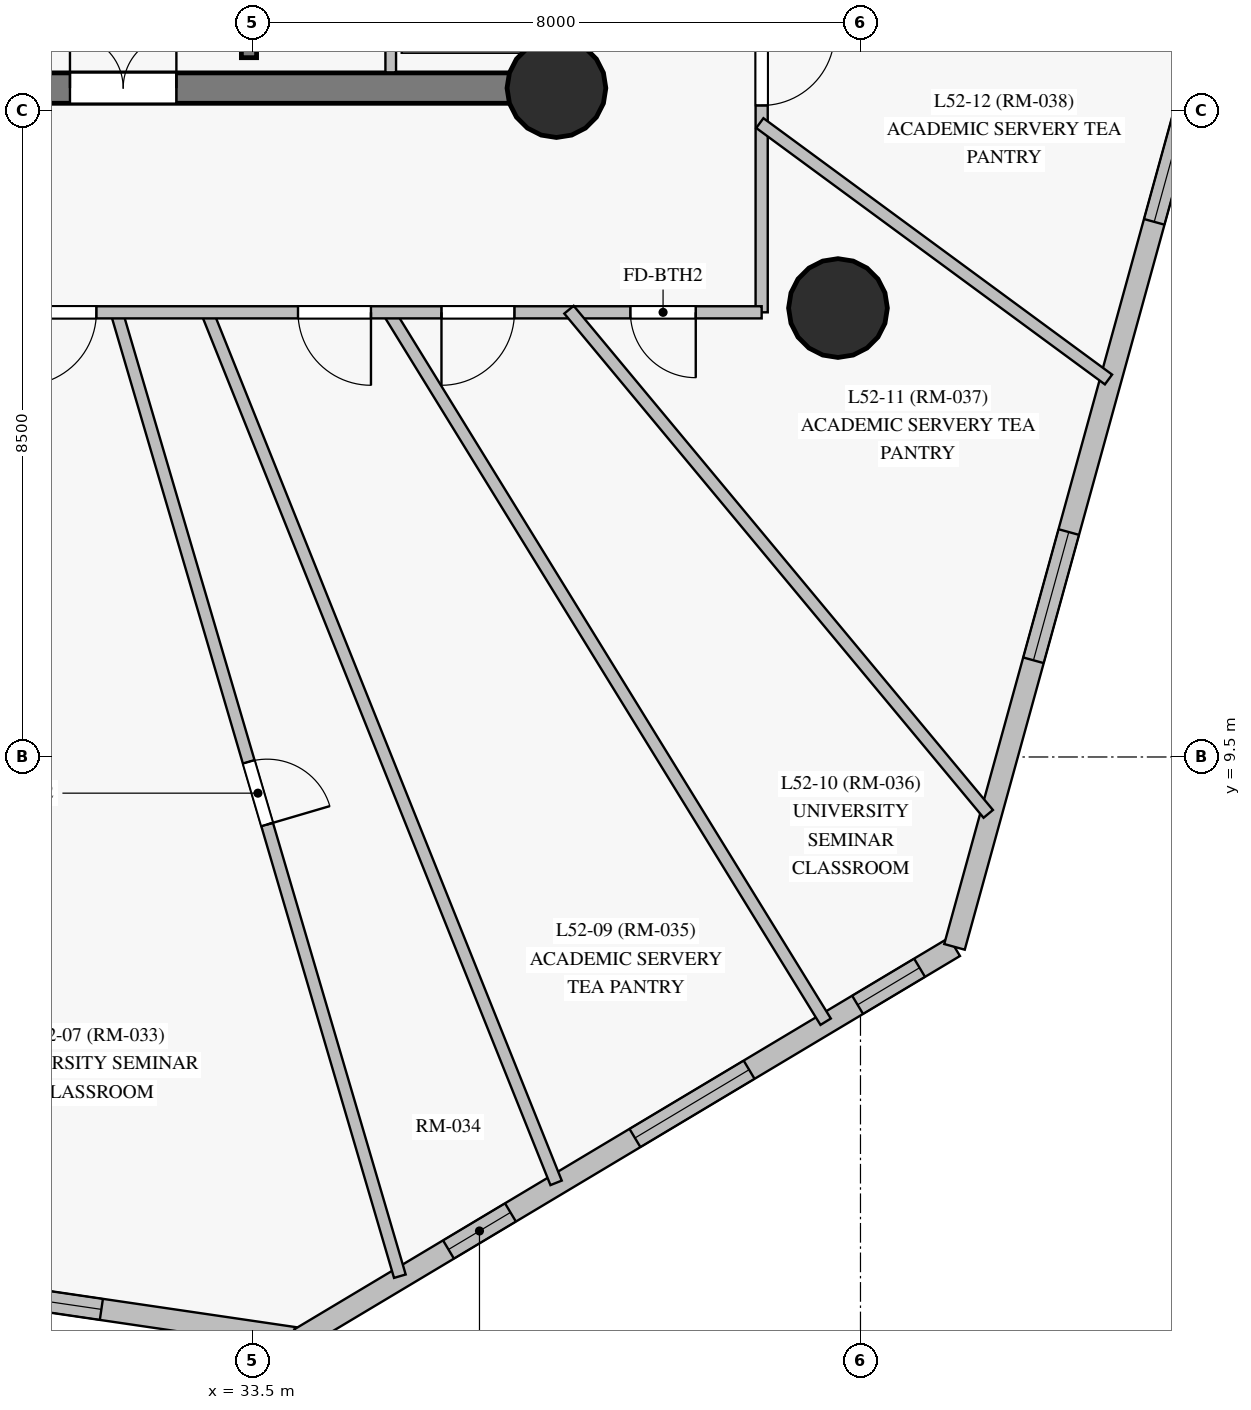
"""IFC4 building model, lengths in metres.
Left out: names, types, materials, properties, quantities, classifications, styles, units other than length and angle.
Written with IfcOpenShell. Run it as: python <this file> out.ifc"""

import sys

from ifc_helpers import new_model, si_unit, direction, frame, frame_2d, origin, origin_with_axes, origin_2d, place, context, subcontext, project, spatial, rectangle, circle, extrude, source, transform, mapped, element, fill, save


model = new_model("IFC4")
c1 = context("Model", 3, precision=1e-05, world=origin(), true_north=direction((0.0, 1.0)))
c2 = subcontext(c1, "Body", "Model", "MODEL_VIEW")
j1 = project(units=[si_unit("LENGTHUNIT", "METRE"), si_unit("PLANEANGLEUNIT", "RADIAN")], contexts=[c1])
p1 = place(None, origin())
s1 = spatial("IfcSite", under=j1, at=p1, CompositionType="ELEMENT")
p2 = place(p1, origin())
s2 = spatial("IfcBuilding", under=s1, at=p2, CompositionType="ELEMENT")
p3 = place(p2, frame((0.0, 0.0, 180.95)))
s3 = spatial("IfcBuildingStorey", under=s2, at=p3, CompositionType="ELEMENT", Elevation=180.95)
p4 = place(p3, frame((26.55, 18.3, 0.0), z_axis=(0.0, 0.0, 1.0), x_axis=(1.0, 0.0, 0.0)))
e1 = element("IfcWall", 1, at=p4, inside=s3, PredefinedType="SHEAR", context=c2, shape_type="SweptSolid", body=[
    extrude(rectangle(XDim=10.95, YDim=0.4, at=frame_2d((5.475, 0.0))), origin(), (0.0, 0.0, 1.0), 2.825),
])
p5 = place(p4, frame((4.55, 0.0, 0.0)))
e2 = element("IfcOpeningElement", 2, at=p5, cuts=e1, PredefinedType="OPENING", context=c2, shape_type="SweptSolid", body=[
    extrude(rectangle(XDim=1.4, YDim=2.2, at=frame_2d((0.7, 1.1))), frame((0.0, 0.21, 0.0), z_axis=(0.0, -1.0, 0.0), x_axis=(1.0, 0.0, 0.0)), (0.0, 0.0, 1.0), 0.42),
])
p6 = place(p3, frame((37.5, 18.3, 0.0), z_axis=(0.0, 0.0, 1.0), x_axis=(0.0, 1.0, 0.0)))
e3 = element("IfcWall", 3, at=p6, inside=s3, PredefinedType="SHEAR", context=c2, shape_type="SweptSolid", body=[
    extrude(rectangle(XDim=16.4, YDim=0.4, at=frame_2d((8.2, 0.0))), origin(), (0.0, 0.0, 1.0), 2.825),
])
p7 = place(p6, frame((14.15, 0.0, 0.0)))
e4 = element("IfcOpeningElement", 4, at=p7, cuts=e3, PredefinedType="OPENING", context=c2, shape_type="SweptSolid", body=[
    extrude(rectangle(XDim=1.2, YDim=2.15, at=frame_2d((0.6, 1.075))), frame((0.0, 0.21, 0.0), z_axis=(0.0, -1.0, 0.0), x_axis=(1.0, 0.0, 0.0)), (0.0, 0.0, 1.0), 0.42),
])
m1 = source(origin_with_axes(), c2, "Body", "SweptSolid", [
    extrude(circle(Radius=0.65, at=origin_2d()), origin(), (0.0, 0.0, 1.0), 3.05),
])
for number, where, z_axis, x_axis in (
    (5, (37.5, 18.3, 0.0), (0.0, 0.0, 1.0), (1.0, 0.0, 0.0)),
    (6, (41.204, 15.406, 0.0), (0.0, 0.0, 1.0), (1.0, 0.0, 0.0)),
):
    element("IfcColumn", number, at=place(p3, frame(where, z_axis=z_axis, x_axis=x_axis)), inside=s3, PredefinedType="COLUMN", context=c2, shape_type="MappedRepresentation", body=[
        mapped(m1, transform((0.0, 0.0, 0.0), scale=1.0)),
    ])
p8 = place(p3, frame((21.422, 3.713, 0.0), z_axis=(0.0, 0.0, 1.0), x_axis=(0.989415023511, -0.145113442696, 0.0)))
e7 = element("IfcWall", 7, at=p8, inside=s3, PredefinedType="SOLIDWALL", context=c2, shape_type="SweptSolid", body=[
    extrude(rectangle(XDim=12.837, YDim=0.28, at=frame_2d((6.418, 0.0))), origin(), (0.0, 0.0, 1.0), 2.825),
])
p9 = place(p8, frame((2.718, 0.0, 0.85)))
e8 = element("IfcOpeningElement", 8, at=p9, cuts=e7, PredefinedType="OPENING", context=c2, shape_type="SweptSolid", body=[
    extrude(rectangle(XDim=1.75, YDim=1.65, at=frame_2d((0.875, 0.825))), frame((0.0, 0.15, 0.0), z_axis=(0.0, -1.0, 0.0), x_axis=(1.0, 0.0, 0.0)), (0.0, 0.0, 1.0), 0.3),
])
p10 = place(p8, frame((8.449, 0.0, 0.85)))
e9 = element("IfcOpeningElement", 9, at=p10, cuts=e7, PredefinedType="OPENING", context=c2, shape_type="SweptSolid", body=[
    extrude(rectangle(XDim=1.75, YDim=1.65, at=frame_2d((0.875, 0.825))), frame((0.0, 0.15, 0.0), z_axis=(0.0, -1.0, 0.0), x_axis=(1.0, 0.0, 0.0)), (0.0, 0.0, 1.0), 0.3),
])
p11 = place(p3, frame((34.123, 1.85, 0.0), z_axis=(0.0, 0.0, 1.0), x_axis=(0.858226046781, 0.513271909057, 0.0)))
e10 = element("IfcWall", 10, at=p11, inside=s3, PredefinedType="SOLIDWALL", context=c2, shape_type="SweptSolid", body=[
    extrude(rectangle(XDim=10.037, YDim=0.28, at=frame_2d((5.019, 0.0))), origin(), (0.0, 0.0, 1.0), 2.825),
])
p12 = place(p11, frame((2.28, 0.0, 0.85)))
e11 = element("IfcOpeningElement", 11, at=p12, cuts=e10, PredefinedType="OPENING", context=c2, shape_type="SweptSolid", body=[
    extrude(rectangle(XDim=0.95, YDim=1.5, at=frame_2d((0.475, 0.75))), frame((0.0, 0.15, 0.0), z_axis=(0.0, -1.0, 0.0), x_axis=(1.0, 0.0, 0.0)), (0.0, 0.0, 1.0), 0.3),
])
p13 = place(p11, frame((5.139, 0.0, 0.85)))
e12 = element("IfcOpeningElement", 12, at=p13, cuts=e10, PredefinedType="OPENING", context=c2, shape_type="SweptSolid", body=[
    extrude(rectangle(XDim=1.75, YDim=1.65, at=frame_2d((0.875, 0.825))), frame((0.0, 0.15, 0.0), z_axis=(0.0, -1.0, 0.0), x_axis=(1.0, 0.0, 0.0)), (0.0, 0.0, 1.0), 0.3),
])
p14 = place(p11, frame((8.552, 0.0, 0.85)))
e13 = element("IfcOpeningElement", 13, at=p14, cuts=e10, PredefinedType="OPENING", context=c2, shape_type="SweptSolid", body=[
    extrude(rectangle(XDim=0.95, YDim=1.5, at=frame_2d((0.475, 0.75))), frame((0.0, 0.15, 0.0), z_axis=(0.0, -1.0, 0.0), x_axis=(1.0, 0.0, 0.0)), (0.0, 0.0, 1.0), 0.3),
])
p15 = place(p3, frame((42.737, 7.002, 0.0), z_axis=(0.0, 0.0, 1.0), x_axis=(0.265596536656, 0.964084270029, 0.0)))
e14 = element("IfcWall", 14, at=p15, inside=s3, PredefinedType="SOLIDWALL", context=c2, shape_type="SweptSolid", body=[
    extrude(rectangle(XDim=14.261, YDim=0.28, at=frame_2d((7.13, 0.0))), origin(), (0.0, 0.0, 1.0), 2.825),
])
p16 = place(p15, frame((3.911, 0.0, 0.85)))
e15 = element("IfcOpeningElement", 15, at=p16, cuts=e14, PredefinedType="OPENING", context=c2, shape_type="SweptSolid", body=[
    extrude(rectangle(XDim=1.75, YDim=1.65, at=frame_2d((0.875, 0.825))), frame((0.0, 0.15, 0.0), z_axis=(0.0, -1.0, 0.0), x_axis=(1.0, 0.0, 0.0)), (0.0, 0.0, 1.0), 0.3),
])
p17 = place(p15, frame((9.894, 0.0, 0.85)))
e16 = element("IfcOpeningElement", 16, at=p17, cuts=e14, PredefinedType="OPENING", context=c2, shape_type="SweptSolid", body=[
    extrude(rectangle(XDim=1.75, YDim=1.65, at=frame_2d((0.875, 0.825))), frame((0.0, 0.15, 0.0), z_axis=(0.0, -1.0, 0.0), x_axis=(1.0, 0.0, 0.0)), (0.0, 0.0, 1.0), 0.3),
])
p18 = place(p3, frame((33.455, 18.7, 0.0), z_axis=(0.0, 0.0, 1.0), x_axis=(0.0, 1.0, 0.0)))
e17 = element("IfcWall", 17, at=p18, inside=s3, PredefinedType="SHEAR", context=c2, shape_type="SweptSolid", body=[
    extrude(rectangle(XDim=15.6, YDim=0.2, at=frame_2d((7.8, 0.0))), origin(), (0.0, 0.0, 1.0), 2.825),
])
p19 = place(p18, frame((2.75, 0.0, 0.0)))
e18 = element("IfcOpeningElement", 18, at=p19, cuts=e17, PredefinedType="OPENING", context=c2, shape_type="SweptSolid", body=[
    extrude(rectangle(XDim=1.15, YDim=2.15, at=frame_2d((0.575, 1.075))), frame((0.0, 0.11, 0.0), z_axis=(0.0, -1.0, 0.0), x_axis=(1.0, 0.0, 0.0)), (0.0, 0.0, 1.0), 0.22),
])
p20 = place(p18, frame((0.55, 0.0, 0.0)))
e19 = element("IfcOpeningElement", 19, at=p20, cuts=e17, PredefinedType="OPENING", context=c2, shape_type="SweptSolid", body=[
    extrude(rectangle(XDim=0.94, YDim=2.1, at=frame_2d((0.47, 1.05))), frame((0.0, 0.11, 0.0), z_axis=(0.0, -1.0, 0.0), x_axis=(1.0, 0.0, 0.0)), (0.0, 0.0, 1.0), 0.22),
])
p21 = place(p3, frame((40.2, 37.65, 0.0), z_axis=(0.0, 0.0, 1.0), x_axis=(0.0, -1.0, 0.0)))
e20 = element("IfcWall", 20, at=p21, inside=s3, PredefinedType="PARTITIONING", context=c2, shape_type="SweptSolid", body=[
    extrude(rectangle(XDim=22.3, YDim=0.16, at=frame_2d((11.15, 0.0))), origin(), (0.0, 0.0, 1.0), 2.375),
])
p22 = place(p21, frame((18.619, 0.0, 0.0)))
e21 = element("IfcOpeningElement", 21, at=p22, cuts=e20, PredefinedType="OPENING", context=c2, shape_type="SweptSolid", body=[
    extrude(rectangle(XDim=0.96, YDim=2.15, at=frame_2d((0.48, 1.075))), frame((0.0, 0.09, 0.0), z_axis=(0.0, -1.0, 0.0), x_axis=(1.0, 0.0, 0.0)), (0.0, 0.0, 1.0), 0.18),
])
p23 = place(p21, frame((16.25, 0.0, 0.0)))
e22 = element("IfcOpeningElement", 22, at=p23, cuts=e20, PredefinedType="OPENING", context=c2, shape_type="SweptSolid", body=[
    extrude(rectangle(XDim=0.96, YDim=2.15, at=frame_2d((0.48, 1.075))), frame((0.0, 0.09, 0.0), z_axis=(0.0, -1.0, 0.0), x_axis=(1.0, 0.0, 0.0)), (0.0, 0.0, 1.0), 0.18),
])
p24 = place(p21, frame((10.675, 0.0, 0.0)))
e23 = element("IfcOpeningElement", 23, at=p24, cuts=e20, PredefinedType="OPENING", context=c2, shape_type="SweptSolid", body=[
    extrude(rectangle(XDim=0.96, YDim=2.15, at=frame_2d((0.48, 1.075))), frame((0.0, 0.09, 0.0), z_axis=(0.0, -1.0, 0.0), x_axis=(1.0, 0.0, 0.0)), (0.0, 0.0, 1.0), 0.18),
])
p25 = place(p21, frame((7.33, 0.0, 0.0)))
e24 = element("IfcOpeningElement", 24, at=p25, cuts=e20, PredefinedType="OPENING", context=c2, shape_type="SweptSolid", body=[
    extrude(rectangle(XDim=0.96, YDim=2.15, at=frame_2d((0.48, 1.075))), frame((0.0, 0.09, 0.0), z_axis=(0.0, -1.0, 0.0), x_axis=(1.0, 0.0, 0.0)), (0.0, 0.0, 1.0), 0.18),
])
p26 = place(p21, frame((5.1, 0.0, 0.0)))
e25 = element("IfcOpeningElement", 25, at=p26, cuts=e20, PredefinedType="OPENING", context=c2, shape_type="SweptSolid", body=[
    extrude(rectangle(XDim=0.96, YDim=2.15, at=frame_2d((0.48, 1.075))), frame((0.0, 0.09, 0.0), z_axis=(0.0, -1.0, 0.0), x_axis=(1.0, 0.0, 0.0)), (0.0, 0.0, 1.0), 0.18),
])
p27 = place(p3, frame((31.705, 15.379, 0.0), z_axis=(0.0, 0.0, 1.0), x_axis=(0.281920857813, -0.959437663389, 0.0)))
e26 = element("IfcWall", 26, at=p27, inside=s3, PredefinedType="PARTITIONING", context=c2, shape_type="SweptSolid", body=[
    extrude(rectangle(XDim=13.247, YDim=0.16, at=frame_2d((6.624, 0.0))), origin(), (0.0, 0.0, 1.0), 2.825),
])
p28 = place(p27, frame((6.193, 0.0, 0.0)))
e27 = element("IfcOpeningElement", 27, at=p28, cuts=e26, PredefinedType="OPENING", context=c2, shape_type="SweptSolid", body=[
    extrude(rectangle(XDim=0.86, YDim=2.04, at=frame_2d((0.43, 1.02))), frame((0.0, 0.09, 0.0), z_axis=(0.0, -1.0, 0.0), x_axis=(1.0, 0.0, 0.0)), (0.0, 0.0, 1.0), 0.18),
])
p29 = place(p3, frame((32.894, 15.378, 0.0), z_axis=(0.0, 0.0, 1.0), x_axis=(0.372061025982, -0.928208270242, 0.0)))
e28 = element("IfcWall", 28, at=p29, inside=s3, PredefinedType="PARTITIONING", context=c2, shape_type="SweptSolid", body=[
    extrude(rectangle(XDim=12.368, YDim=0.16, at=frame_2d((6.184, 0.0))), origin(), (0.0, 0.0, 1.0), 2.825),
])
p30 = place(p3, frame((35.279, 15.375, 0.0), z_axis=(0.0, 0.0, 1.0), x_axis=(0.524324221798, -0.851518708213, 0.0)))
e29 = element("IfcWall", 29, at=p30, inside=s3, PredefinedType="PARTITIONING", context=c2, shape_type="SweptSolid", body=[
    extrude(rectangle(XDim=10.99, YDim=0.16, at=frame_2d((5.495, 0.0))), origin(), (0.0, 0.0, 1.0), 2.825),
])
p31 = place(p3, frame((40.2, 15.35, 0.0), z_axis=(0.0, 0.0, 1.0), x_axis=(-1.0, 0.0, 0.0)))
e30 = element("IfcWall", 30, at=p31, inside=s3, PredefinedType="PARTITIONING", context=c2, shape_type="SweptSolid", body=[
    extrude(rectangle(XDim=10.65, YDim=0.16, at=frame_2d((5.325, 0.0))), origin(), (0.0, 0.0, 1.0), 2.275),
])
p32 = place(p31, frame((8.752, 0.0, 0.0)))
e31 = element("IfcOpeningElement", 31, at=p32, cuts=e30, PredefinedType="OPENING", context=c2, shape_type="SweptSolid", body=[
    extrude(rectangle(XDim=0.96, YDim=2.15, at=frame_2d((0.48, 1.075))), frame((0.0, 0.09, 0.0), z_axis=(0.0, -1.0, 0.0), x_axis=(1.0, 0.0, 0.0)), (0.0, 0.0, 1.0), 0.18),
])
p33 = place(p31, frame((5.14, 0.0, 0.0)))
e32 = element("IfcOpeningElement", 32, at=p33, cuts=e30, PredefinedType="OPENING", context=c2, shape_type="SweptSolid", body=[
    extrude(rectangle(XDim=0.96, YDim=2.15, at=frame_2d((0.48, 1.075))), frame((0.0, 0.09, 0.0), z_axis=(0.0, -1.0, 0.0), x_axis=(1.0, 0.0, 0.0)), (0.0, 0.0, 1.0), 0.18),
])
p34 = place(p31, frame((3.252, 0.0, 0.0)))
e33 = element("IfcOpeningElement", 33, at=p34, cuts=e30, PredefinedType="OPENING", context=c2, shape_type="SweptSolid", body=[
    extrude(rectangle(XDim=0.96, YDim=2.15, at=frame_2d((0.48, 1.075))), frame((0.0, 0.09, 0.0), z_axis=(0.0, -1.0, 0.0), x_axis=(1.0, 0.0, 0.0)), (0.0, 0.0, 1.0), 0.18),
])
p35 = place(p31, frame((0.867, 0.0, 0.0)))
e34 = element("IfcOpeningElement", 34, at=p35, cuts=e30, PredefinedType="OPENING", context=c2, shape_type="SweptSolid", body=[
    extrude(rectangle(XDim=0.86, YDim=2.04, at=frame_2d((0.43, 1.02))), frame((0.0, 0.09, 0.0), z_axis=(0.0, -1.0, 0.0), x_axis=(1.0, 0.0, 0.0)), (0.0, 0.0, 1.0), 0.18),
])
p36 = place(p3, frame((37.665, 15.385, 0.0), z_axis=(0.0, 0.0, 1.0), x_axis=(0.639368423228, -0.768900526323, 0.0)))
e35 = element("IfcWall", 35, at=p36, inside=s3, PredefinedType="PARTITIONING", context=c2, shape_type="SweptSolid", body=[
    extrude(rectangle(XDim=8.627, YDim=0.16, at=frame_2d((4.313, 0.0))), origin(), (0.0, 0.0, 1.0), 2.825),
])
p37 = place(p3, frame((40.176, 17.84, 0.0), z_axis=(0.0, 0.0, 1.0), x_axis=(0.805619112409, -0.592433832357, 0.0)))
e36 = element("IfcWall", 36, at=p37, inside=s3, PredefinedType="PARTITIONING", context=c2, shape_type="SweptSolid", body=[
    extrude(rectangle(XDim=5.694, YDim=0.16, at=frame_2d((2.847, 0.0))), origin(), (0.0, 0.0, 1.0), 2.825),
])
p38 = place(p3, frame((35.32, 18.507, 0.0), z_axis=(0.0, 0.0, 1.0), x_axis=(0.0, 1.0, 0.0)))
e37 = element("IfcWall", 37, at=p38, inside=s3, PredefinedType="PARTITIONING", context=c2, shape_type="SweptSolid", body=[
    extrude(rectangle(XDim=2.604, YDim=0.14, at=frame_2d((1.302, 0.0))), origin(), (0.0, 0.0, 1.0), 2.825),
])
m2 = source(origin_with_axes(), c2, "Body", "SweptSolid", [
    extrude(rectangle(XDim=1.75, YDim=1.65, at=frame_2d((0.875, 0.825))), frame((0.0, 0.03, 0.0), z_axis=(0.0, -1.0, 0.0), x_axis=(1.0, 0.0, 0.0)), (0.0, 0.0, 1.0), 0.06),
])
p39 = place(p10, origin())
e38 = element("IfcWindow", 38, at=p39, inside=s3, PartitioningType="SINGLE_PANEL", PredefinedType="WINDOW", context=c2, shape_type="MappedRepresentation", body=[
    mapped(m2, transform((0.0, 0.0, 0.0), scale=1.0)),
])
fill(e9, e38)
m3 = source(origin_with_axes(), c2, "Body", "SweptSolid", [
    extrude(rectangle(XDim=0.95, YDim=1.5, at=frame_2d((0.475, 0.75))), frame((0.0, 0.03, 0.0), z_axis=(0.0, -1.0, 0.0), x_axis=(1.0, 0.0, 0.0)), (0.0, 0.0, 1.0), 0.06),
])
p40 = place(p12, origin())
e39 = element("IfcWindow", 39, at=p40, inside=s3, PartitioningType="SINGLE_PANEL", PredefinedType="WINDOW", context=c2, shape_type="MappedRepresentation", body=[
    mapped(m3, transform((0.0, 0.0, 0.0), scale=1.0)),
])
fill(e11, e39)
p41 = place(p13, origin())
e40 = element("IfcWindow", 40, at=p41, inside=s3, PartitioningType="SINGLE_PANEL", PredefinedType="WINDOW", context=c2, shape_type="MappedRepresentation", body=[
    mapped(m2, transform((0.0, 0.0, 0.0), scale=1.0)),
])
fill(e12, e40)
p42 = place(p14, origin())
e41 = element("IfcWindow", 41, at=p42, inside=s3, PartitioningType="SINGLE_PANEL", PredefinedType="WINDOW", context=c2, shape_type="MappedRepresentation", body=[
    mapped(m3, transform((0.0, 0.0, 0.0), scale=1.0)),
])
fill(e13, e41)
p43 = place(p16, origin())
e42 = element("IfcWindow", 42, at=p43, inside=s3, PartitioningType="SINGLE_PANEL", PredefinedType="WINDOW", context=c2, shape_type="MappedRepresentation", body=[
    mapped(m2, transform((0.0, 0.0, 0.0), scale=1.0)),
])
fill(e15, e42)
p44 = place(p17, origin())
e43 = element("IfcWindow", 43, at=p44, inside=s3, PartitioningType="SINGLE_PANEL", PredefinedType="WINDOW", context=c2, shape_type="MappedRepresentation", body=[
    mapped(m2, transform((0.0, 0.0, 0.0), scale=1.0)),
])
fill(e16, e43)
m4 = source(origin_with_axes(), c2, "Body", "SweptSolid", [
    extrude(rectangle(XDim=1.4, YDim=2.2, at=frame_2d((0.7, 1.1))), frame((0.0, 0.025, 0.0), z_axis=(0.0, -1.0, 0.0), x_axis=(1.0, 0.0, 0.0)), (0.0, 0.0, 1.0), 0.05),
])
p45 = place(p5, origin())
e44 = element("IfcDoor", 44, at=p45, inside=s3, OperationType="DOUBLE_DOOR_SINGLE_SWING", PredefinedType="DOOR", context=c2, shape_type="MappedRepresentation", body=[
    mapped(m4, transform((0.0, 0.0, 0.0), scale=1.0)),
])
fill(e2, e44)
m5 = source(origin_with_axes(), c2, "Body", "SweptSolid", [
    extrude(rectangle(XDim=0.96, YDim=2.15, at=frame_2d((0.48, 1.075))), frame((0.0, 0.025, 0.0), z_axis=(0.0, -1.0, 0.0), x_axis=(1.0, 0.0, 0.0)), (0.0, 0.0, 1.0), 0.05),
])
p46 = place(p32, origin())
e45 = element("IfcDoor", 45, at=p46, inside=s3, OperationType="SINGLE_SWING_RIGHT", PredefinedType="DOOR", context=c2, shape_type="MappedRepresentation", body=[
    mapped(m5, transform((0.0, 0.0, 0.0), scale=1.0)),
])
fill(e31, e45)
p47 = place(p33, origin())
e46 = element("IfcDoor", 46, at=p47, inside=s3, OperationType="SINGLE_SWING_LEFT", PredefinedType="DOOR", context=c2, shape_type="MappedRepresentation", body=[
    mapped(m5, transform((0.0, 0.0, 0.0), scale=1.0)),
])
fill(e32, e46)
p48 = place(p34, origin())
e47 = element("IfcDoor", 47, at=p48, inside=s3, OperationType="SINGLE_SWING_RIGHT", PredefinedType="DOOR", context=c2, shape_type="MappedRepresentation", body=[
    mapped(m5, transform((0.0, 0.0, 0.0), scale=1.0)),
])
fill(e33, e47)
p49 = place(p22, origin())
e48 = element("IfcDoor", 48, at=p49, inside=s3, OperationType="SINGLE_SWING_LEFT", PredefinedType="DOOR", context=c2, shape_type="MappedRepresentation", body=[
    mapped(m5, transform((0.0, 0.0, 0.0), scale=1.0)),
])
fill(e21, e48)
m6 = source(origin_with_axes(), c2, "Body", "SweptSolid", [
    extrude(rectangle(XDim=0.86, YDim=2.04, at=frame_2d((0.43, 1.02))), frame((0.0, 0.025, 0.0), z_axis=(0.0, -1.0, 0.0), x_axis=(1.0, 0.0, 0.0)), (0.0, 0.0, 1.0), 0.05),
])
p50 = place(p28, origin())
e49 = element("IfcDoor", 49, at=p50, inside=s3, OperationType="SINGLE_SWING_RIGHT", PredefinedType="DOOR", context=c2, shape_type="MappedRepresentation", body=[
    mapped(m6, transform((0.0, 0.0, 0.0), scale=1.0)),
])
fill(e27, e49)
p51 = place(p35, origin())
e50 = element("IfcDoor", 50, at=p51, inside=s3, OperationType="SINGLE_SWING_LEFT", PredefinedType="DOOR", context=c2, shape_type="MappedRepresentation", body=[
    mapped(m6, transform((0.0, 0.0, 0.0), scale=1.0)),
])
fill(e34, e50)
save(model, sys.argv[1])
